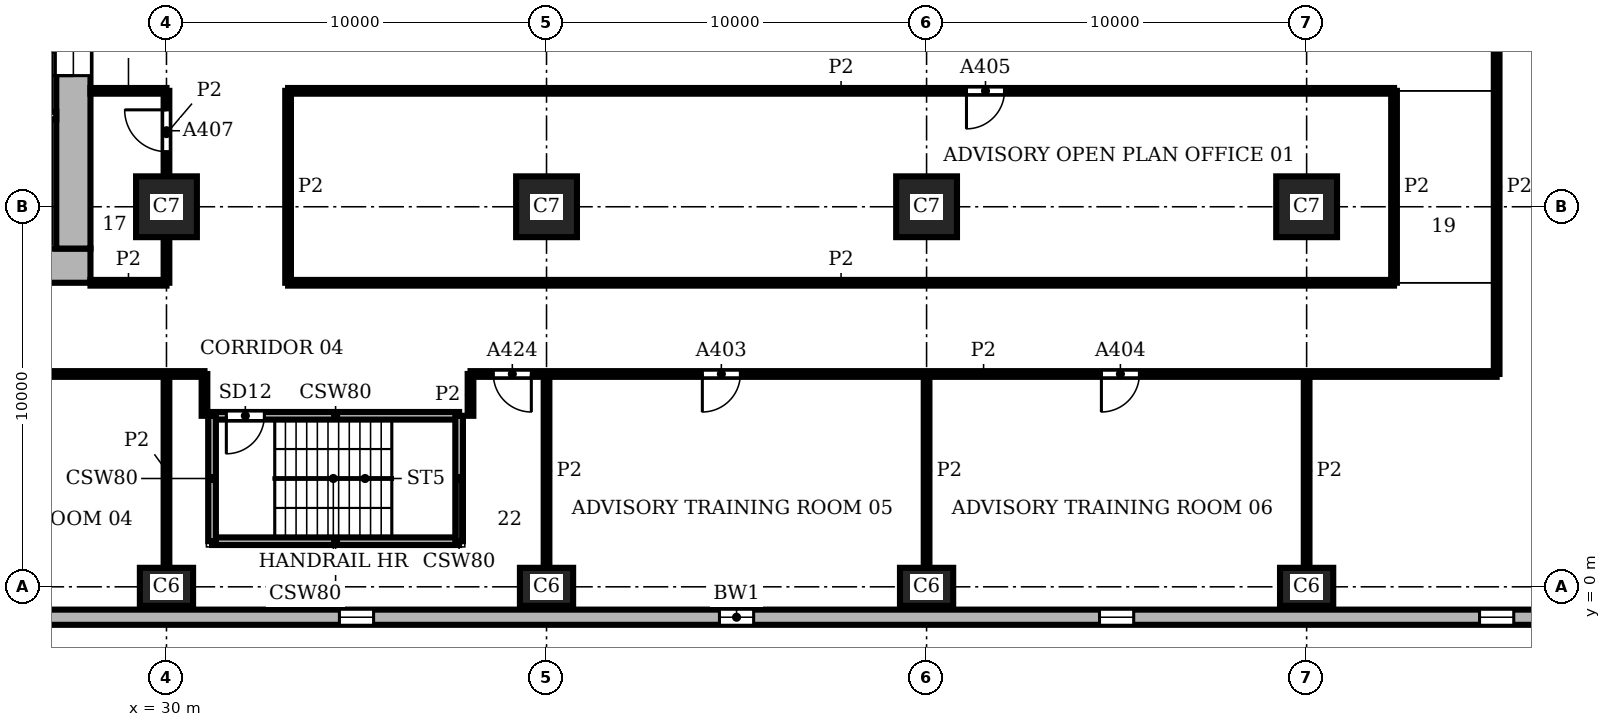
"""IFC4 building model, lengths in metres.
Left out: names, types, materials, properties, quantities, classifications, styles, units other than length and angle.
Written with IfcOpenShell. Run it as: python <this file> out.ifc"""

import sys

from ifc_helpers import new_model, si_unit, direction, frame, frame_2d, origin, origin_2d, place, context, subcontext, project, spatial, rectangle, extrude, element, fill, save


model = new_model("IFC4")
c1 = context("Model", 3, precision=1e-05, world=origin(), true_north=direction((0.0, 1.0)))
c2 = subcontext(c1, "Body", "Model", "MODEL_VIEW")
j1 = project(units=[si_unit("LENGTHUNIT", "METRE"), si_unit("PLANEANGLEUNIT", "RADIAN")], contexts=[c1])
p1 = place(None, origin())
s1 = spatial("IfcSite", under=j1, at=p1, CompositionType="ELEMENT")
p2 = place(p1, origin())
s2 = spatial("IfcBuilding", under=s1, at=p2, CompositionType="ELEMENT")
p3 = place(p2, frame((0.0, 0.0, 47.1)))
s3 = spatial("IfcBuildingStorey", under=s2, at=p3, CompositionType="ELEMENT", Elevation=47.1)
for number, where, z_axis, x_axis in (
    (1, (30.0, 0.0, 0.0), (0.0, 0.0, 1.0), (1.0, 0.0, 0.0)),
    (2, (40.0, 0.0, 0.0), (0.0, 0.0, 1.0), (1.0, 0.0, 0.0)),
    (3, (50.0, 0.0, 0.0), (0.0, 0.0, 1.0), (1.0, 0.0, 0.0)),
    (4, (60.0, 0.0, 0.0), (0.0, 0.0, 1.0), (1.0, 0.0, 0.0)),
):
    element("IfcColumn", number, at=place(p3, frame(where, z_axis=z_axis, x_axis=x_axis)), inside=s3, PredefinedType="COLUMN", context=c2, shape_type="SweptSolid", body=[
        extrude(rectangle(XDim=1.4, YDim=1.0, at=origin_2d()), origin(), (0.0, 0.0, 1.0), 3.9),
    ])
for number, where, z_axis, x_axis in (
    (5, (30.0, 10.0, 0.0), (0.0, 0.0, 1.0), (1.0, 0.0, 0.0)),
    (6, (40.0, 10.0, 0.0), (0.0, 0.0, 1.0), (1.0, 0.0, 0.0)),
    (7, (50.0, 10.0, 0.0), (0.0, 0.0, 1.0), (1.0, 0.0, 0.0)),
    (8, (60.0, 10.0, 0.0), (0.0, 0.0, 1.0), (1.0, 0.0, 0.0)),
):
    element("IfcColumn", number, at=place(p3, frame(where, z_axis=z_axis, x_axis=x_axis)), inside=s3, PredefinedType="COLUMN", context=c2, shape_type="SweptSolid", body=[
        extrude(rectangle(XDim=1.6, YDim=1.6, at=origin_2d()), origin(), (0.0, 0.0, 1.0), 3.9),
    ])
p4 = place(p3, frame((8.0, 8.45, 0.0), z_axis=(0.0, 0.0, 1.0), x_axis=(1.0, 0.0, 0.0)))
e9 = element("IfcWall", 9, at=p4, inside=s3, PredefinedType="SHEAR", context=c2, shape_type="SweptSolid", body=[
    extrude(rectangle(XDim=20.0, YDim=0.9, at=frame_2d((10.0, 0.0))), origin(), (0.0, 0.0, 1.0), 3.9),
])
p5 = place(p3, frame((27.55, 8.9, 0.0), z_axis=(0.0, 0.0, 1.0), x_axis=(0.0, 1.0, 0.0)))
e10 = element("IfcWall", 10, at=p5, inside=s3, PredefinedType="SHEAR", context=c2, shape_type="SweptSolid", body=[
    extrude(rectangle(XDim=18.2, YDim=0.9, at=frame_2d((9.1, 0.0))), origin(), (0.0, 0.0, 1.0), 3.9),
])
p6 = place(p5, frame((4.55, 0.0, 0.0)))
e11 = element("IfcOpeningElement", 11, at=p6, cuts=e10, PredefinedType="OPENING", context=c2, shape_type="SweptSolid", body=[
    extrude(rectangle(XDim=1.6, YDim=2.1, at=frame_2d((0.8, 1.05))), frame((0.0, 0.46, 0.0), z_axis=(0.0, -1.0, 0.0), x_axis=(1.0, 0.0, 0.0)), (0.0, 0.0, 1.0), 0.92),
])
p7 = place(p3, frame((20.8, -0.8, 0.0), z_axis=(0.0, 0.0, 1.0), x_axis=(1.0, 0.0, 0.0)))
e12 = element("IfcWall", 12, at=p7, inside=s3, PredefinedType="SOLIDWALL", context=c2, shape_type="SweptSolid", body=[
    extrude(rectangle(XDim=48.4, YDim=0.4, at=frame_2d((24.2, 0.0))), origin(), (0.0, 0.0, 1.0), 3.9),
])
p8 = place(p7, frame((3.75, 0.0, 0.9)))
e13 = element("IfcOpeningElement", 13, at=p8, cuts=e12, PredefinedType="OPENING", context=c2, shape_type="SweptSolid", body=[
    extrude(rectangle(XDim=0.9, YDim=2.35, at=frame_2d((0.45, 1.175))), frame((0.0, 0.21, 0.0), z_axis=(0.0, -1.0, 0.0), x_axis=(1.0, 0.0, 0.0)), (0.0, 0.0, 1.0), 0.42),
])
p9 = place(p7, frame((13.75, 0.0, 0.9)))
e14 = element("IfcOpeningElement", 14, at=p9, cuts=e12, PredefinedType="OPENING", context=c2, shape_type="SweptSolid", body=[
    extrude(rectangle(XDim=0.9, YDim=2.35, at=frame_2d((0.45, 1.175))), frame((0.0, 0.21, 0.0), z_axis=(0.0, -1.0, 0.0), x_axis=(1.0, 0.0, 0.0)), (0.0, 0.0, 1.0), 0.42),
])
p10 = place(p7, frame((23.75, 0.0, 0.9)))
e15 = element("IfcOpeningElement", 15, at=p10, cuts=e12, PredefinedType="OPENING", context=c2, shape_type="SweptSolid", body=[
    extrude(rectangle(XDim=0.9, YDim=2.35, at=frame_2d((0.45, 1.175))), frame((0.0, 0.21, 0.0), z_axis=(0.0, -1.0, 0.0), x_axis=(1.0, 0.0, 0.0)), (0.0, 0.0, 1.0), 0.42),
])
p11 = place(p7, frame((33.75, 0.0, 0.9)))
e16 = element("IfcOpeningElement", 16, at=p11, cuts=e12, PredefinedType="OPENING", context=c2, shape_type="SweptSolid", body=[
    extrude(rectangle(XDim=0.9, YDim=2.35, at=frame_2d((0.45, 1.175))), frame((0.0, 0.21, 0.0), z_axis=(0.0, -1.0, 0.0), x_axis=(1.0, 0.0, 0.0)), (0.0, 0.0, 1.0), 0.42),
])
p12 = place(p7, frame((43.75, 0.0, 0.9)))
e17 = element("IfcOpeningElement", 17, at=p12, cuts=e12, PredefinedType="OPENING", context=c2, shape_type="SweptSolid", body=[
    extrude(rectangle(XDim=0.9, YDim=2.35, at=frame_2d((0.45, 1.175))), frame((0.0, 0.21, 0.0), z_axis=(0.0, -1.0, 0.0), x_axis=(1.0, 0.0, 0.0)), (0.0, 0.0, 1.0), 0.42),
])
p13 = place(p3, frame((31.2, 1.2, 0.0), z_axis=(0.0, 0.0, 1.0), x_axis=(1.0, 0.0, 0.0)))
e18 = element("IfcWall", 18, at=p13, inside=s3, PredefinedType="SHEAR", context=c2, shape_type="SweptSolid", body=[
    extrude(rectangle(XDim=6.5, YDim=0.2, at=frame_2d((3.25, 0.0))), origin(), (0.0, 0.0, 1.0), 3.58),
])
p14 = place(p3, frame((31.2, 4.5, 0.0), z_axis=(0.0, 0.0, 1.0), x_axis=(1.0, 0.0, 0.0)))
e19 = element("IfcWall", 19, at=p14, inside=s3, PredefinedType="SHEAR", context=c2, shape_type="SweptSolid", body=[
    extrude(rectangle(XDim=6.5, YDim=0.2, at=frame_2d((3.25, 0.0))), origin(), (0.0, 0.0, 1.0), 3.58),
])
p15 = place(p14, frame((0.375, 0.0, 0.0)))
e20 = element("IfcOpeningElement", 20, at=p15, cuts=e19, PredefinedType="OPENING", context=c2, shape_type="SweptSolid", body=[
    extrude(rectangle(XDim=1.0, YDim=2.1, at=frame_2d((0.5, 1.05))), frame((0.0, 0.11, 0.0), z_axis=(0.0, -1.0, 0.0), x_axis=(1.0, 0.0, 0.0)), (0.0, 0.0, 1.0), 0.22),
])
p16 = place(p3, frame((13.8, 12.4, 0.0), z_axis=(0.0, 0.0, 1.0), x_axis=(1.0, 0.0, 0.0)))
e21 = element("IfcWall", 21, at=p16, inside=s3, PredefinedType="SHEAR", context=c2, shape_type="SweptSolid", body=[
    extrude(rectangle(XDim=13.3, YDim=0.2, at=frame_2d((6.65, 0.0))), origin(), (0.0, 0.0, 1.0), 3.58),
])
p17 = place(p16, frame((2.4, 0.0, 0.0)))
e22 = element("IfcOpeningElement", 22, at=p17, cuts=e21, PredefinedType="OPENING", context=c2, shape_type="SweptSolid", body=[
    extrude(rectangle(XDim=1.1, YDim=2.1, at=frame_2d((0.55, 1.05))), frame((0.0, 0.11, 0.0), z_axis=(0.0, -1.0, 0.0), x_axis=(1.0, 0.0, 0.0)), (0.0, 0.0, 1.0), 0.22),
])
p18 = place(p16, frame((4.9, 0.0, 0.0)))
e23 = element("IfcOpeningElement", 23, at=p18, cuts=e21, PredefinedType="OPENING", context=c2, shape_type="SweptSolid", body=[
    extrude(rectangle(XDim=1.1, YDim=2.1, at=frame_2d((0.55, 1.05))), frame((0.0, 0.11, 0.0), z_axis=(0.0, -1.0, 0.0), x_axis=(1.0, 0.0, 0.0)), (0.0, 0.0, 1.0), 0.22),
])
p19 = place(p16, frame((0.25, 0.0, 0.0)))
e24 = element("IfcOpeningElement", 24, at=p19, cuts=e21, PredefinedType="OPENING", context=c2, shape_type="SweptSolid", body=[
    extrude(rectangle(XDim=1.0, YDim=2.1, at=frame_2d((0.5, 1.05))), frame((0.0, 0.11, 0.0), z_axis=(0.0, -1.0, 0.0), x_axis=(1.0, 0.0, 0.0)), (0.0, 0.0, 1.0), 0.22),
])
for number, where, z_axis, x_axis in (
    (25, (31.2, 1.2, 0.0), (0.0, 0.0, 1.0), (0.0, 1.0, 0.0)),
    (26, (37.7, 1.2, 0.0), (0.0, 0.0, 1.0), (0.0, 1.0, 0.0)),
):
    element("IfcWall", number, at=place(p3, frame(where, z_axis=z_axis, x_axis=x_axis)), inside=s3, PredefinedType="SHEAR", context=c2, shape_type="SweptSolid", body=[
        extrude(rectangle(XDim=3.3, YDim=0.2, at=frame_2d((1.65, 0.0))), origin(), (0.0, 0.0, 1.0), 3.58),
    ])
p20 = place(p3, frame((30.0, 0.5, 0.0), z_axis=(0.0, 0.0, 1.0), x_axis=(0.0, 1.0, 0.0)))
e27 = element("IfcWall", 27, at=p20, inside=s3, PredefinedType="PARTITIONING", context=c2, shape_type="SweptSolid", body=[
    extrude(rectangle(XDim=5.1, YDim=0.15, at=frame_2d((2.55, 0.0))), origin(), (0.0, 0.0, 1.0), 3.58),
])
p21 = place(p3, frame((30.0, 8.0, 0.0), z_axis=(0.0, 0.0, 1.0), x_axis=(0.0, 1.0, 0.0)))
e28 = element("IfcWall", 28, at=p21, inside=s3, PredefinedType="PARTITIONING", context=c2, shape_type="SweptSolid", body=[
    extrude(rectangle(XDim=1.2, YDim=0.15, at=frame_2d((0.6, 0.0))), origin(), (0.0, 0.0, 1.0), 3.58),
])
p22 = place(p3, frame((30.0, 10.8, 0.0), z_axis=(0.0, 0.0, 1.0), x_axis=(0.0, 1.0, 0.0)))
e29 = element("IfcWall", 29, at=p22, inside=s3, PredefinedType="PARTITIONING", context=c2, shape_type="SweptSolid", body=[
    extrude(rectangle(XDim=2.25, YDim=0.15, at=frame_2d((1.125, 0.0))), origin(), (0.0, 0.0, 1.0), 3.58),
])
p23 = place(p22, frame((0.65, 0.0, 0.0)))
e30 = element("IfcOpeningElement", 30, at=p23, cuts=e29, PredefinedType="OPENING", context=c2, shape_type="SweptSolid", body=[
    extrude(rectangle(XDim=1.1, YDim=2.1, at=frame_2d((0.55, 1.05))), frame((0.0, 0.085, 0.0), z_axis=(0.0, -1.0, 0.0), x_axis=(1.0, 0.0, 0.0)), (0.0, 0.0, 1.0), 0.17),
])
p24 = place(p3, frame((31.0, 4.5, 0.0), z_axis=(0.0, 0.0, 1.0), x_axis=(0.0, 1.0, 0.0)))
e31 = element("IfcWall", 31, at=p24, inside=s3, PredefinedType="PARTITIONING", context=c2, shape_type="SweptSolid", body=[
    extrude(rectangle(XDim=1.1, YDim=0.15, at=frame_2d((0.55, 0.0))), origin(), (0.0, 0.0, 1.0), 3.58),
])
p25 = place(p3, frame((33.2, 8.0, 0.0), z_axis=(0.0, 0.0, 1.0), x_axis=(0.0, 1.0, 0.0)))
e32 = element("IfcWall", 32, at=p25, inside=s3, PredefinedType="PARTITIONING", context=c2, shape_type="SweptSolid", body=[
    extrude(rectangle(XDim=5.05, YDim=0.15, at=frame_2d((2.525, 0.0))), origin(), (0.0, 0.0, 1.0), 3.58),
])
p26 = place(p3, frame((38.0, 4.5, 0.0), z_axis=(0.0, 0.0, 1.0), x_axis=(0.0, 1.0, 0.0)))
e33 = element("IfcWall", 33, at=p26, inside=s3, PredefinedType="PARTITIONING", context=c2, shape_type="SweptSolid", body=[
    extrude(rectangle(XDim=1.1, YDim=0.15, at=frame_2d((0.55, 0.0))), origin(), (0.0, 0.0, 1.0), 3.58),
])
for number, where, z_axis, x_axis in (
    (34, (40.0, 0.5, 0.0), (0.0, 0.0, 1.0), (0.0, 1.0, 0.0)),
    (35, (50.0, 0.5, 0.0), (0.0, 0.0, 1.0), (0.0, 1.0, 0.0)),
    (36, (60.0, 0.5, 0.0), (0.0, 0.0, 1.0), (0.0, 1.0, 0.0)),
):
    element("IfcWall", number, at=place(p3, frame(where, z_axis=z_axis, x_axis=x_axis)), inside=s3, PredefinedType="PARTITIONING", context=c2, shape_type="SweptSolid", body=[
        extrude(rectangle(XDim=5.1, YDim=0.15, at=frame_2d((2.55, 0.0))), origin(), (0.0, 0.0, 1.0), 3.58),
    ])
p27 = place(p3, frame((62.3, 8.0, 0.0), z_axis=(0.0, 0.0, 1.0), x_axis=(0.0, 1.0, 0.0)))
e37 = element("IfcWall", 37, at=p27, inside=s3, PredefinedType="PARTITIONING", context=c2, shape_type="SweptSolid", body=[
    extrude(rectangle(XDim=5.05, YDim=0.15, at=frame_2d((2.525, 0.0))), origin(), (0.0, 0.0, 1.0), 3.58),
])
p28 = place(p3, frame((65.0, 5.6, 0.0), z_axis=(0.0, 0.0, 1.0), x_axis=(0.0, 1.0, 0.0)))
e38 = element("IfcWall", 38, at=p28, inside=s3, PredefinedType="PARTITIONING", context=c2, shape_type="SweptSolid", body=[
    extrude(rectangle(XDim=9.85, YDim=0.15, at=frame_2d((4.925, 0.0))), origin(), (0.0, 0.0, 1.0), 3.58),
])
p29 = place(p3, frame((5.6, 5.6, 0.0), z_axis=(0.0, 0.0, 1.0), x_axis=(1.0, 0.0, 0.0)))
e39 = element("IfcWall", 39, at=p29, inside=s3, PredefinedType="PARTITIONING", context=c2, shape_type="SweptSolid", body=[
    extrude(rectangle(XDim=25.4, YDim=0.15, at=frame_2d((12.7, 0.0))), origin(), (0.0, 0.0, 1.0), 3.58),
])
p30 = place(p29, frame((5.35, 0.0, 0.0)))
e40 = element("IfcOpeningElement", 40, at=p30, cuts=e39, PredefinedType="OPENING", context=c2, shape_type="SweptSolid", body=[
    extrude(rectangle(XDim=1.0, YDim=2.1, at=frame_2d((0.5, 1.05))), frame((0.0, 0.085, 0.0), z_axis=(0.0, -1.0, 0.0), x_axis=(1.0, 0.0, 0.0)), (0.0, 0.0, 1.0), 0.17),
])
p31 = place(p29, frame((12.0, 0.0, 0.0)))
e41 = element("IfcOpeningElement", 41, at=p31, cuts=e39, PredefinedType="OPENING", context=c2, shape_type="SweptSolid", body=[
    extrude(rectangle(XDim=0.8, YDim=2.1, at=frame_2d((0.4, 1.05))), frame((0.0, 0.085, 0.0), z_axis=(0.0, -1.0, 0.0), x_axis=(1.0, 0.0, 0.0)), (0.0, 0.0, 1.0), 0.17),
])
p32 = place(p29, frame((19.25, 0.0, 0.0)))
e42 = element("IfcOpeningElement", 42, at=p32, cuts=e39, PredefinedType="OPENING", context=c2, shape_type="SweptSolid", body=[
    extrude(rectangle(XDim=1.0, YDim=2.1, at=frame_2d((0.5, 1.05))), frame((0.0, 0.085, 0.0), z_axis=(0.0, -1.0, 0.0), x_axis=(1.0, 0.0, 0.0)), (0.0, 0.0, 1.0), 0.17),
])
p33 = place(p3, frame((38.0, 5.6, 0.0), z_axis=(0.0, 0.0, 1.0), x_axis=(1.0, 0.0, 0.0)))
e43 = element("IfcWall", 43, at=p33, inside=s3, PredefinedType="PARTITIONING", context=c2, shape_type="SweptSolid", body=[
    extrude(rectangle(XDim=27.0, YDim=0.15, at=frame_2d((13.5, 0.0))), origin(), (0.0, 0.0, 1.0), 3.58),
])
p34 = place(p33, frame((6.1, 0.0, 0.0)))
e44 = element("IfcOpeningElement", 44, at=p34, cuts=e43, PredefinedType="OPENING", context=c2, shape_type="SweptSolid", body=[
    extrude(rectangle(XDim=1.0, YDim=2.1, at=frame_2d((0.5, 1.05))), frame((0.0, 0.085, 0.0), z_axis=(0.0, -1.0, 0.0), x_axis=(1.0, 0.0, 0.0)), (0.0, 0.0, 1.0), 0.17),
])
p35 = place(p33, frame((16.6, 0.0, 0.0)))
e45 = element("IfcOpeningElement", 45, at=p35, cuts=e43, PredefinedType="OPENING", context=c2, shape_type="SweptSolid", body=[
    extrude(rectangle(XDim=1.0, YDim=2.1, at=frame_2d((0.5, 1.05))), frame((0.0, 0.085, 0.0), z_axis=(0.0, -1.0, 0.0), x_axis=(1.0, 0.0, 0.0)), (0.0, 0.0, 1.0), 0.17),
])
p36 = place(p33, frame((0.6, 0.0, 0.0)))
e46 = element("IfcOpeningElement", 46, at=p36, cuts=e43, PredefinedType="OPENING", context=c2, shape_type="SweptSolid", body=[
    extrude(rectangle(XDim=1.0, YDim=2.1, at=frame_2d((0.5, 1.05))), frame((0.0, 0.085, 0.0), z_axis=(0.0, -1.0, 0.0), x_axis=(1.0, 0.0, 0.0)), (0.0, 0.0, 1.0), 0.17),
])
p37 = place(p3, frame((28.0, 8.0, 0.0), z_axis=(0.0, 0.0, 1.0), x_axis=(1.0, 0.0, 0.0)))
e47 = element("IfcWall", 47, at=p37, inside=s3, PredefinedType="PARTITIONING", context=c2, shape_type="SweptSolid", body=[
    extrude(rectangle(XDim=2.0, YDim=0.15, at=frame_2d((1.0, 0.0))), origin(), (0.0, 0.0, 1.0), 3.58),
])
p38 = place(p3, frame((33.2, 8.0, 0.0), z_axis=(0.0, 0.0, 1.0), x_axis=(1.0, 0.0, 0.0)))
e48 = element("IfcWall", 48, at=p38, inside=s3, PredefinedType="PARTITIONING", context=c2, shape_type="SweptSolid", body=[
    extrude(rectangle(XDim=29.1, YDim=0.15, at=frame_2d((14.55, 0.0))), origin(), (0.0, 0.0, 1.0), 3.58),
])
p39 = place(p3, frame((28.0, 13.05, 0.0), z_axis=(0.0, 0.0, 1.0), x_axis=(1.0, 0.0, 0.0)))
e49 = element("IfcWall", 49, at=p39, inside=s3, PredefinedType="PARTITIONING", context=c2, shape_type="SweptSolid", body=[
    extrude(rectangle(XDim=2.0, YDim=0.15, at=frame_2d((1.0, 0.0))), origin(), (0.0, 0.0, 1.0), 3.58),
])
p40 = place(p3, frame((33.2, 13.05, 0.0), z_axis=(0.0, 0.0, 1.0), x_axis=(1.0, 0.0, 0.0)))
e50 = element("IfcWall", 50, at=p40, inside=s3, PredefinedType="PARTITIONING", context=c2, shape_type="SweptSolid", body=[
    extrude(rectangle(XDim=29.1, YDim=0.15, at=frame_2d((14.55, 0.0))), origin(), (0.0, 0.0, 1.0), 3.58),
])
p41 = place(p40, frame((17.85, 0.0, 0.0)))
e51 = element("IfcOpeningElement", 51, at=p41, cuts=e50, PredefinedType="OPENING", context=c2, shape_type="SweptSolid", body=[
    extrude(rectangle(XDim=1.0, YDim=2.1, at=frame_2d((0.5, 1.05))), frame((0.0, 0.085, 0.0), z_axis=(0.0, -1.0, 0.0), x_axis=(1.0, 0.0, 0.0)), (0.0, 0.0, 1.0), 0.17),
])
p42 = place(p9, origin())
e52 = element("IfcWindow", 52, at=p42, inside=s3, PartitioningType="SINGLE_PANEL", PredefinedType="WINDOW", context=c2, shape_type="SweptSolid", body=[
    extrude(rectangle(XDim=0.9, YDim=2.35, at=frame_2d((0.45, 1.175))), frame((0.0, 0.16, 0.0), z_axis=(0.0, -1.0, 0.0), x_axis=(1.0, 0.0, 0.0)), (0.0, 0.0, 1.0), 0.06),
])
fill(e14, e52)
p43 = place(p10, origin())
e53 = element("IfcWindow", 53, at=p43, inside=s3, PartitioningType="SINGLE_PANEL", PredefinedType="WINDOW", context=c2, shape_type="SweptSolid", body=[
    extrude(rectangle(XDim=0.9, YDim=2.35, at=frame_2d((0.45, 1.175))), frame((0.0, 0.16, 0.0), z_axis=(0.0, -1.0, 0.0), x_axis=(1.0, 0.0, 0.0)), (0.0, 0.0, 1.0), 0.06),
])
fill(e15, e53)
p44 = place(p11, origin())
e54 = element("IfcWindow", 54, at=p44, inside=s3, PartitioningType="SINGLE_PANEL", PredefinedType="WINDOW", context=c2, shape_type="SweptSolid", body=[
    extrude(rectangle(XDim=0.9, YDim=2.35, at=frame_2d((0.45, 1.175))), frame((0.0, 0.16, 0.0), z_axis=(0.0, -1.0, 0.0), x_axis=(1.0, 0.0, 0.0)), (0.0, 0.0, 1.0), 0.06),
])
fill(e16, e54)
p45 = place(p12, origin())
e55 = element("IfcWindow", 55, at=p45, inside=s3, PartitioningType="SINGLE_PANEL", PredefinedType="WINDOW", context=c2, shape_type="SweptSolid", body=[
    extrude(rectangle(XDim=0.9, YDim=2.35, at=frame_2d((0.45, 1.175))), frame((0.0, 0.16, 0.0), z_axis=(0.0, -1.0, 0.0), x_axis=(1.0, 0.0, 0.0)), (0.0, 0.0, 1.0), 0.06),
])
fill(e17, e55)
p46 = place(p15, frame((1.0, 0.0, 0.0), z_axis=(0.0, 0.0, 1.0), x_axis=(-1.0, 0.0, 0.0)))
e56 = element("IfcDoor", 56, at=p46, inside=s3, OperationType="SINGLE_SWING_RIGHT", PredefinedType="DOOR", context=c2, shape_type="SweptSolid", body=[
    extrude(rectangle(XDim=1.0, YDim=2.1, at=frame_2d((0.5, 1.05))), frame((0.0, 0.025, 0.0), z_axis=(0.0, -1.0, 0.0), x_axis=(1.0, 0.0, 0.0)), (0.0, 0.0, 1.0), 0.05),
])
fill(e20, e56)
p47 = place(p6, origin())
e57 = element("IfcDoor", 57, at=p47, inside=s3, OperationType="DOUBLE_DOOR_SINGLE_SWING", PredefinedType="DOOR", context=c2, shape_type="SweptSolid", body=[
    extrude(rectangle(XDim=1.6, YDim=2.1, at=frame_2d((0.8, 1.05))), frame((0.0, 0.025, 0.0), z_axis=(0.0, -1.0, 0.0), x_axis=(1.0, 0.0, 0.0)), (0.0, 0.0, 1.0), 0.05),
])
fill(e11, e57)
p48 = place(p34, frame((1.0, 0.0, 0.0), z_axis=(0.0, 0.0, 1.0), x_axis=(-1.0, 0.0, 0.0)))
e58 = element("IfcDoor", 58, at=p48, inside=s3, OperationType="SINGLE_SWING_RIGHT", PredefinedType="DOOR", context=c2, shape_type="SweptSolid", body=[
    extrude(rectangle(XDim=1.0, YDim=2.1, at=frame_2d((0.5, 1.05))), frame((0.0, 0.025, 0.0), z_axis=(0.0, -1.0, 0.0), x_axis=(1.0, 0.0, 0.0)), (0.0, 0.0, 1.0), 0.05),
])
fill(e44, e58)
p49 = place(p35, frame((1.0, 0.0, 0.0), z_axis=(0.0, 0.0, 1.0), x_axis=(-1.0, 0.0, 0.0)))
e59 = element("IfcDoor", 59, at=p49, inside=s3, OperationType="SINGLE_SWING_RIGHT", PredefinedType="DOOR", context=c2, shape_type="SweptSolid", body=[
    extrude(rectangle(XDim=1.0, YDim=2.1, at=frame_2d((0.5, 1.05))), frame((0.0, 0.025, 0.0), z_axis=(0.0, -1.0, 0.0), x_axis=(1.0, 0.0, 0.0)), (0.0, 0.0, 1.0), 0.05),
])
fill(e45, e59)
p50 = place(p41, frame((1.0, 0.0, 0.0), z_axis=(0.0, 0.0, 1.0), x_axis=(-1.0, 0.0, 0.0)))
e60 = element("IfcDoor", 60, at=p50, inside=s3, OperationType="SINGLE_SWING_RIGHT", PredefinedType="DOOR", context=c2, shape_type="SweptSolid", body=[
    extrude(rectangle(XDim=1.0, YDim=2.1, at=frame_2d((0.5, 1.05))), frame((0.0, 0.025, 0.0), z_axis=(0.0, -1.0, 0.0), x_axis=(1.0, 0.0, 0.0)), (0.0, 0.0, 1.0), 0.05),
])
fill(e51, e60)
p51 = place(p23, origin())
e61 = element("IfcDoor", 61, at=p51, inside=s3, OperationType="SINGLE_SWING_RIGHT", PredefinedType="DOOR", context=c2, shape_type="SweptSolid", body=[
    extrude(rectangle(XDim=1.1, YDim=2.1, at=frame_2d((0.55, 1.05))), frame((0.0, 0.025, 0.0), z_axis=(0.0, -1.0, 0.0), x_axis=(1.0, 0.0, 0.0)), (0.0, 0.0, 1.0), 0.05),
])
fill(e30, e61)
p52 = place(p36, frame((1.0, 0.0, 0.0), z_axis=(0.0, 0.0, 1.0), x_axis=(-1.0, 0.0, 0.0)))
e62 = element("IfcDoor", 62, at=p52, inside=s3, OperationType="SINGLE_SWING_LEFT", PredefinedType="DOOR", context=c2, shape_type="SweptSolid", body=[
    extrude(rectangle(XDim=1.0, YDim=2.1, at=frame_2d((0.5, 1.05))), frame((0.0, 0.025, 0.0), z_axis=(0.0, -1.0, 0.0), x_axis=(1.0, 0.0, 0.0)), (0.0, 0.0, 1.0), 0.05),
])
fill(e46, e62)
save(model, sys.argv[1])
